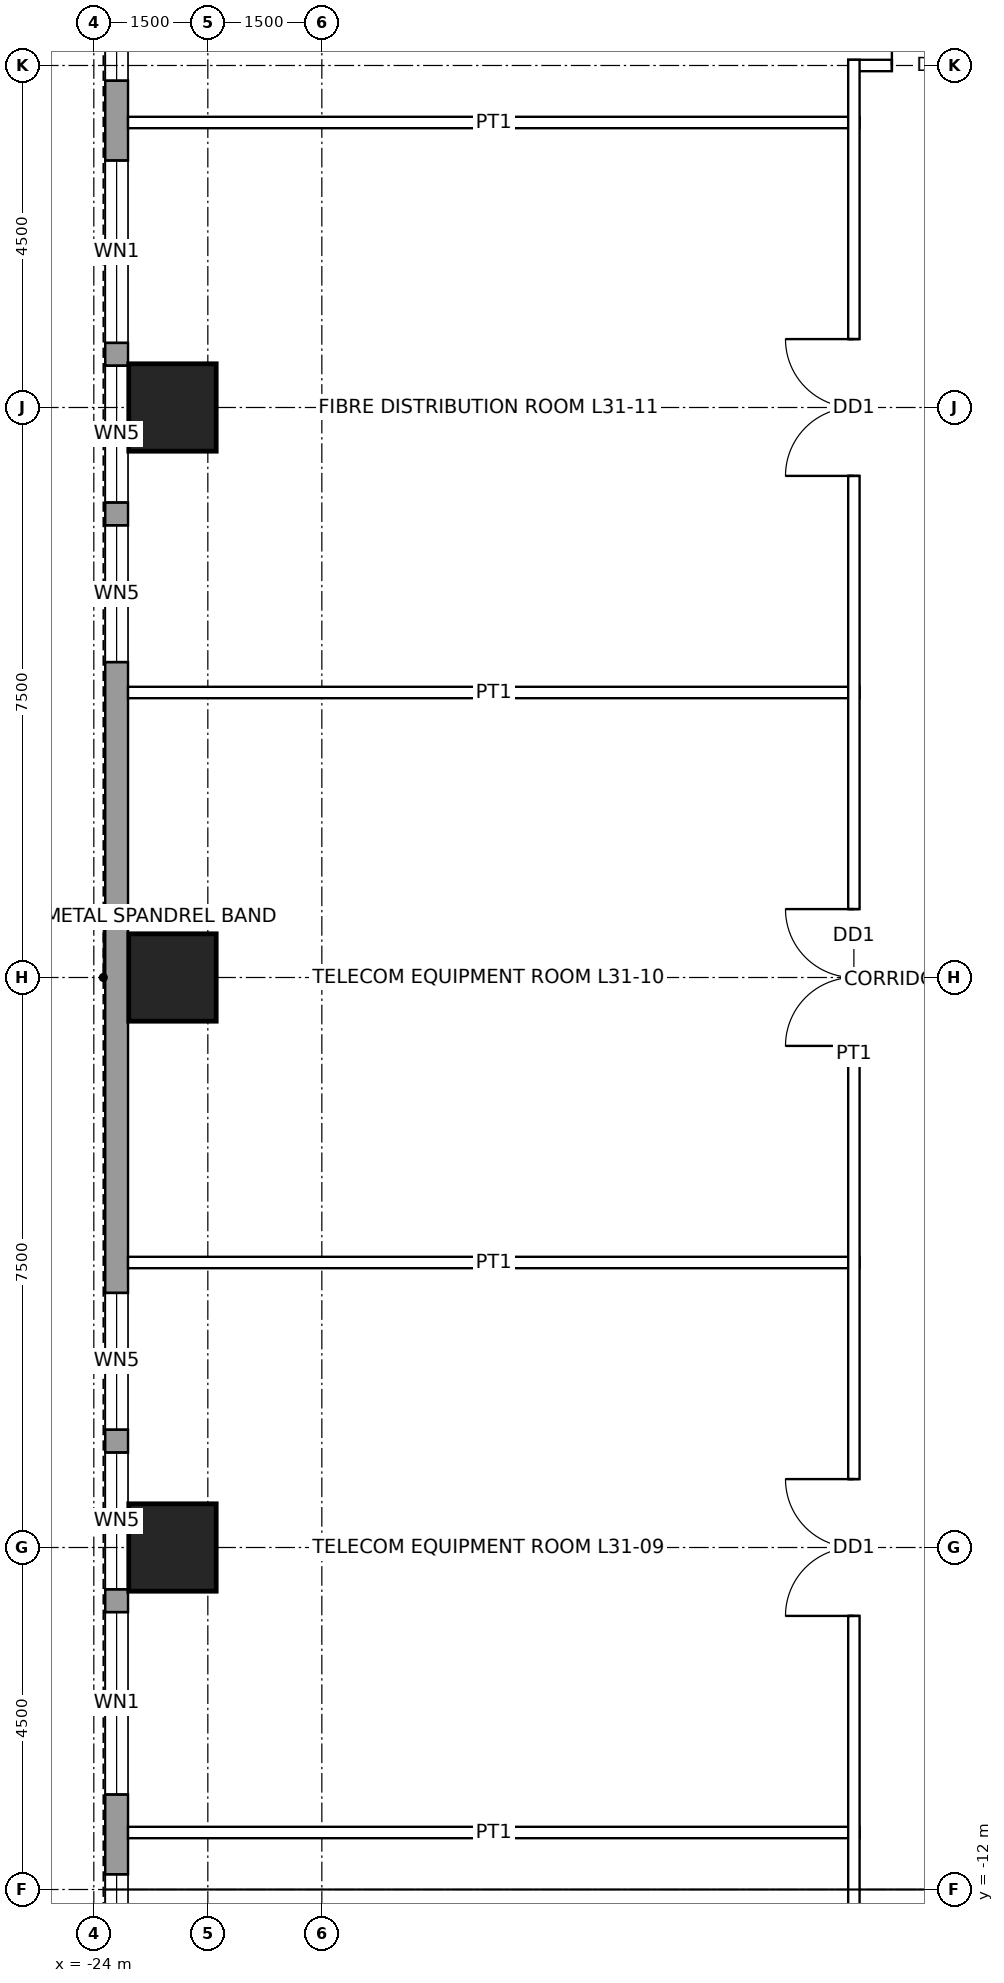
"""IFC4 building model, lengths in metres.
Left out: names, types, materials, properties, quantities, classifications, styles, units other than length and angle.
Written with IfcOpenShell. Run it as: python <this file> out.ifc"""

import sys

from ifc_helpers import new_model, si_unit, direction, frame, frame_2d, origin, origin_2d, place, context, subcontext, project, spatial, rectangle, hollow_rectangle, extrude, element, fill, save


model = new_model("IFC4")
c1 = context("Model", 3, precision=1e-05, world=origin(), true_north=direction((0.0, 1.0)))
c2 = subcontext(c1, "Body", "Model", "MODEL_VIEW")
j1 = project(units=[si_unit("LENGTHUNIT", "METRE"), si_unit("PLANEANGLEUNIT", "RADIAN")], contexts=[c1])
p1 = place(None, origin())
s1 = spatial("IfcSite", under=j1, at=p1, CompositionType="ELEMENT")
p2 = place(p1, origin())
s2 = spatial("IfcBuilding", under=s1, at=p2, CompositionType="ELEMENT")
p3 = place(p2, frame((0.0, 0.0, 153.9)))
s3 = spatial("IfcBuildingStorey", under=s2, at=p3, CompositionType="ELEMENT", Elevation=153.9)
for number, where, z_axis, x_axis in (
    (1, (-22.965, -7.5, 0.0), (0.0, 0.0, 1.0), (1.0, 0.0, 0.0)),
    (2, (-22.965, 0.0, 0.0), (0.0, 0.0, 1.0), (1.0, 0.0, 0.0)),
    (3, (-22.965, 7.5, 0.0), (0.0, 0.0, 1.0), (1.0, 0.0, 0.0)),
):
    element("IfcColumn", number, at=place(p3, frame(where, z_axis=z_axis, x_axis=x_axis)), inside=s3, PredefinedType="COLUMN", context=c2, shape_type="SweptSolid", body=[
        extrude(hollow_rectangle(XDim=1.15, YDim=1.15, WallThickness=0.075, at=origin_2d()), origin(), (0.0, 0.0, 1.0), 4.5),
    ])
p4 = place(p3, frame((-23.7, -16.2, 0.0), z_axis=(0.0, 0.0, 1.0), x_axis=(0.0, 1.0, 0.0)))
e4 = element("IfcWall", 4, at=p4, inside=s3, PredefinedType="SOLIDWALL", context=c2, shape_type="SweptSolid", body=[
    extrude(rectangle(XDim=32.4, YDim=0.3, at=frame_2d((16.2, 0.0))), origin(), (0.0, 0.0, 1.0), 4.3),
])
p5 = place(p4, frame((2.0, 0.0, 1.0)))
e5 = element("IfcOpeningElement", 5, at=p5, cuts=e4, PredefinedType="OPENING", context=c2, shape_type="SweptSolid", body=[
    extrude(rectangle(XDim=2.4, YDim=1.2, at=frame_2d((1.2, 0.6))), frame((0.0, 0.16, 0.0), z_axis=(0.0, -1.0, 0.0), x_axis=(1.0, 0.0, 0.0)), (0.0, 0.0, 1.0), 0.32),
])
p6 = place(p4, frame((5.45, 0.0, 1.0)))
e6 = element("IfcOpeningElement", 6, at=p6, cuts=e4, PredefinedType="OPENING", context=c2, shape_type="SweptSolid", body=[
    extrude(rectangle(XDim=2.4, YDim=1.2, at=frame_2d((1.2, 0.6))), frame((0.0, 0.16, 0.0), z_axis=(0.0, -1.0, 0.0), x_axis=(1.0, 0.0, 0.0)), (0.0, 0.0, 1.0), 0.32),
])
p7 = place(p4, frame((8.15, 0.0, 1.0)))
e7 = element("IfcOpeningElement", 7, at=p7, cuts=e4, PredefinedType="OPENING", context=c2, shape_type="SweptSolid", body=[
    extrude(rectangle(XDim=1.8, YDim=1.2, at=frame_2d((0.9, 0.6))), frame((0.0, 0.16, 0.0), z_axis=(0.0, -1.0, 0.0), x_axis=(1.0, 0.0, 0.0)), (0.0, 0.0, 1.0), 0.32),
])
p8 = place(p4, frame((10.25, 0.0, 1.0)))
e8 = element("IfcOpeningElement", 8, at=p8, cuts=e4, PredefinedType="OPENING", context=c2, shape_type="SweptSolid", body=[
    extrude(rectangle(XDim=1.8, YDim=1.2, at=frame_2d((0.9, 0.6))), frame((0.0, 0.16, 0.0), z_axis=(0.0, -1.0, 0.0), x_axis=(1.0, 0.0, 0.0)), (0.0, 0.0, 1.0), 0.32),
])
p9 = place(p4, frame((20.35, 0.0, 1.0)))
e9 = element("IfcOpeningElement", 9, at=p9, cuts=e4, PredefinedType="OPENING", context=c2, shape_type="SweptSolid", body=[
    extrude(rectangle(XDim=1.8, YDim=1.2, at=frame_2d((0.9, 0.6))), frame((0.0, 0.16, 0.0), z_axis=(0.0, -1.0, 0.0), x_axis=(1.0, 0.0, 0.0)), (0.0, 0.0, 1.0), 0.32),
])
p10 = place(p4, frame((22.45, 0.0, 1.0)))
e10 = element("IfcOpeningElement", 10, at=p10, cuts=e4, PredefinedType="OPENING", context=c2, shape_type="SweptSolid", body=[
    extrude(rectangle(XDim=1.8, YDim=1.2, at=frame_2d((0.9, 0.6))), frame((0.0, 0.16, 0.0), z_axis=(0.0, -1.0, 0.0), x_axis=(1.0, 0.0, 0.0)), (0.0, 0.0, 1.0), 0.32),
])
p11 = place(p4, frame((24.55, 0.0, 1.0)))
e11 = element("IfcOpeningElement", 11, at=p11, cuts=e4, PredefinedType="OPENING", context=c2, shape_type="SweptSolid", body=[
    extrude(rectangle(XDim=2.4, YDim=1.2, at=frame_2d((1.2, 0.6))), frame((0.0, 0.16, 0.0), z_axis=(0.0, -1.0, 0.0), x_axis=(1.0, 0.0, 0.0)), (0.0, 0.0, 1.0), 0.32),
])
p12 = place(p4, frame((28.0, 0.0, 1.0)))
e12 = element("IfcOpeningElement", 12, at=p12, cuts=e4, PredefinedType="OPENING", context=c2, shape_type="SweptSolid", body=[
    extrude(rectangle(XDim=2.4, YDim=1.2, at=frame_2d((1.2, 0.6))), frame((0.0, 0.16, 0.0), z_axis=(0.0, -1.0, 0.0), x_axis=(1.0, 0.0, 0.0)), (0.0, 0.0, 1.0), 0.32),
])
for number, where, z_axis, x_axis in (
    (13, (-23.55, -11.25, 0.0), (0.0, 0.0, 1.0), (1.0, 0.0, 0.0)),
    (14, (-23.55, -3.75, 0.0), (0.0, 0.0, 1.0), (1.0, 0.0, 0.0)),
    (15, (-23.55, 3.75, 0.0), (0.0, 0.0, 1.0), (1.0, 0.0, 0.0)),
    (16, (-23.55, 11.25, 0.0), (0.0, 0.0, 1.0), (1.0, 0.0, 0.0)),
):
    element("IfcWall", number, at=place(p3, frame(where, z_axis=z_axis, x_axis=x_axis)), inside=s3, PredefinedType="PARTITIONING", context=c2, shape_type="SweptSolid", body=[
        extrude(rectangle(XDim=9.625, YDim=0.15, at=frame_2d((4.812, 0.0))), origin(), (0.0, 0.0, 1.0), 3.431),
    ])
p13 = place(p3, frame((-14.075, 12.0, 0.0), z_axis=(0.0, 0.0, 1.0), x_axis=(1.0, 0.0, 0.0)))
e17 = element("IfcWall", 17, at=p13, inside=s3, PredefinedType="PARTITIONING", context=c2, shape_type="SweptSolid", body=[
    extrude(rectangle(XDim=2.075, YDim=0.15, at=frame_2d((1.038, 0.0))), origin(), (0.0, 0.0, 1.0), 4.3),
])
p14 = place(p13, frame((0.575, 0.0, 0.0)))
e18 = element("IfcOpeningElement", 18, at=p14, cuts=e17, PredefinedType="OPENING", context=c2, shape_type="SweptSolid", body=[
    extrude(rectangle(XDim=1.0, YDim=2.1, at=frame_2d((0.5, 1.05))), frame((0.0, 0.085, 0.0), z_axis=(0.0, -1.0, 0.0), x_axis=(1.0, 0.0, 0.0)), (0.0, 0.0, 1.0), 0.17),
])
p15 = place(p3, frame((-14.0, -14.075, 0.0), z_axis=(0.0, 0.0, 1.0), x_axis=(0.0, 1.0, 0.0)))
e19 = element("IfcWall", 19, at=p15, inside=s3, PredefinedType="PARTITIONING", context=c2, shape_type="SweptSolid", body=[
    extrude(rectangle(XDim=26.15, YDim=0.15, at=frame_2d((13.075, 0.0))), origin(), (0.0, 0.0, 1.0), 4.3),
])
p16 = place(p15, frame((5.675, 0.0, 0.0)))
e20 = element("IfcOpeningElement", 20, at=p16, cuts=e19, PredefinedType="OPENING", context=c2, shape_type="SweptSolid", body=[
    extrude(rectangle(XDim=1.8, YDim=2.4, at=frame_2d((0.9, 1.2))), frame((0.0, 0.085, 0.0), z_axis=(0.0, -1.0, 0.0), x_axis=(1.0, 0.0, 0.0)), (0.0, 0.0, 1.0), 0.17),
])
p17 = place(p15, frame((13.175, 0.0, 0.0)))
e21 = element("IfcOpeningElement", 21, at=p17, cuts=e19, PredefinedType="OPENING", context=c2, shape_type="SweptSolid", body=[
    extrude(rectangle(XDim=1.8, YDim=2.4, at=frame_2d((0.9, 1.2))), frame((0.0, 0.085, 0.0), z_axis=(0.0, -1.0, 0.0), x_axis=(1.0, 0.0, 0.0)), (0.0, 0.0, 1.0), 0.17),
])
p18 = place(p15, frame((20.675, 0.0, 0.0)))
e22 = element("IfcOpeningElement", 22, at=p18, cuts=e19, PredefinedType="OPENING", context=c2, shape_type="SweptSolid", body=[
    extrude(rectangle(XDim=1.8, YDim=2.4, at=frame_2d((0.9, 1.2))), frame((0.0, 0.085, 0.0), z_axis=(0.0, -1.0, 0.0), x_axis=(1.0, 0.0, 0.0)), (0.0, 0.0, 1.0), 0.17),
])
p19 = place(p5, origin())
e23 = element("IfcWindow", 23, at=p19, inside=s3, PartitioningType="SINGLE_PANEL", PredefinedType="WINDOW", context=c2, shape_type="SweptSolid", body=[
    extrude(rectangle(XDim=2.4, YDim=1.2, at=frame_2d((1.2, 0.6))), frame((0.0, 0.03, 0.0), z_axis=(0.0, -1.0, 0.0), x_axis=(1.0, 0.0, 0.0)), (0.0, 0.0, 1.0), 0.06),
])
fill(e5, e23)
p20 = place(p6, origin())
e24 = element("IfcWindow", 24, at=p20, inside=s3, PartitioningType="SINGLE_PANEL", PredefinedType="WINDOW", context=c2, shape_type="SweptSolid", body=[
    extrude(rectangle(XDim=2.4, YDim=1.2, at=frame_2d((1.2, 0.6))), frame((0.0, 0.03, 0.0), z_axis=(0.0, -1.0, 0.0), x_axis=(1.0, 0.0, 0.0)), (0.0, 0.0, 1.0), 0.06),
])
fill(e6, e24)
p21 = place(p7, origin())
e25 = element("IfcWindow", 25, at=p21, inside=s3, PartitioningType="SINGLE_PANEL", PredefinedType="WINDOW", context=c2, shape_type="SweptSolid", body=[
    extrude(rectangle(XDim=1.8, YDim=1.2, at=frame_2d((0.9, 0.6))), frame((0.0, 0.03, 0.0), z_axis=(0.0, -1.0, 0.0), x_axis=(1.0, 0.0, 0.0)), (0.0, 0.0, 1.0), 0.06),
])
fill(e7, e25)
p22 = place(p8, origin())
e26 = element("IfcWindow", 26, at=p22, inside=s3, PartitioningType="SINGLE_PANEL", PredefinedType="WINDOW", context=c2, shape_type="SweptSolid", body=[
    extrude(rectangle(XDim=1.8, YDim=1.2, at=frame_2d((0.9, 0.6))), frame((0.0, 0.03, 0.0), z_axis=(0.0, -1.0, 0.0), x_axis=(1.0, 0.0, 0.0)), (0.0, 0.0, 1.0), 0.06),
])
fill(e8, e26)
p23 = place(p9, origin())
e27 = element("IfcWindow", 27, at=p23, inside=s3, PartitioningType="SINGLE_PANEL", PredefinedType="WINDOW", context=c2, shape_type="SweptSolid", body=[
    extrude(rectangle(XDim=1.8, YDim=1.2, at=frame_2d((0.9, 0.6))), frame((0.0, 0.03, 0.0), z_axis=(0.0, -1.0, 0.0), x_axis=(1.0, 0.0, 0.0)), (0.0, 0.0, 1.0), 0.06),
])
fill(e9, e27)
p24 = place(p10, origin())
e28 = element("IfcWindow", 28, at=p24, inside=s3, PartitioningType="SINGLE_PANEL", PredefinedType="WINDOW", context=c2, shape_type="SweptSolid", body=[
    extrude(rectangle(XDim=1.8, YDim=1.2, at=frame_2d((0.9, 0.6))), frame((0.0, 0.03, 0.0), z_axis=(0.0, -1.0, 0.0), x_axis=(1.0, 0.0, 0.0)), (0.0, 0.0, 1.0), 0.06),
])
fill(e10, e28)
p25 = place(p11, origin())
e29 = element("IfcWindow", 29, at=p25, inside=s3, PartitioningType="SINGLE_PANEL", PredefinedType="WINDOW", context=c2, shape_type="SweptSolid", body=[
    extrude(rectangle(XDim=2.4, YDim=1.2, at=frame_2d((1.2, 0.6))), frame((0.0, 0.03, 0.0), z_axis=(0.0, -1.0, 0.0), x_axis=(1.0, 0.0, 0.0)), (0.0, 0.0, 1.0), 0.06),
])
fill(e11, e29)
p26 = place(p12, origin())
e30 = element("IfcWindow", 30, at=p26, inside=s3, PartitioningType="SINGLE_PANEL", PredefinedType="WINDOW", context=c2, shape_type="SweptSolid", body=[
    extrude(rectangle(XDim=2.4, YDim=1.2, at=frame_2d((1.2, 0.6))), frame((0.0, 0.03, 0.0), z_axis=(0.0, -1.0, 0.0), x_axis=(1.0, 0.0, 0.0)), (0.0, 0.0, 1.0), 0.06),
])
fill(e12, e30)
p27 = place(p16, origin())
e31 = element("IfcDoor", 31, at=p27, inside=s3, OperationType="DOUBLE_DOOR_SINGLE_SWING", PredefinedType="DOOR", context=c2, shape_type="SweptSolid", body=[
    extrude(rectangle(XDim=1.8, YDim=2.4, at=frame_2d((0.9, 1.2))), frame((0.0, 0.025, 0.0), z_axis=(0.0, -1.0, 0.0), x_axis=(1.0, 0.0, 0.0)), (0.0, 0.0, 1.0), 0.05),
])
fill(e20, e31)
p28 = place(p17, origin())
e32 = element("IfcDoor", 32, at=p28, inside=s3, OperationType="DOUBLE_DOOR_SINGLE_SWING", PredefinedType="DOOR", context=c2, shape_type="SweptSolid", body=[
    extrude(rectangle(XDim=1.8, YDim=2.4, at=frame_2d((0.9, 1.2))), frame((0.0, 0.025, 0.0), z_axis=(0.0, -1.0, 0.0), x_axis=(1.0, 0.0, 0.0)), (0.0, 0.0, 1.0), 0.05),
])
fill(e21, e32)
p29 = place(p18, origin())
e33 = element("IfcDoor", 33, at=p29, inside=s3, OperationType="DOUBLE_DOOR_SINGLE_SWING", PredefinedType="DOOR", context=c2, shape_type="SweptSolid", body=[
    extrude(rectangle(XDim=1.8, YDim=2.4, at=frame_2d((0.9, 1.2))), frame((0.0, 0.025, 0.0), z_axis=(0.0, -1.0, 0.0), x_axis=(1.0, 0.0, 0.0)), (0.0, 0.0, 1.0), 0.05),
])
fill(e22, e33)
p30 = place(p14, origin())
e34 = element("IfcDoor", 34, at=p30, inside=s3, OperationType="SINGLE_SWING_LEFT", PredefinedType="DOOR", context=c2, shape_type="SweptSolid", body=[
    extrude(rectangle(XDim=1.0, YDim=2.1, at=frame_2d((0.5, 1.05))), frame((0.0, 0.025, 0.0), z_axis=(0.0, -1.0, 0.0), x_axis=(1.0, 0.0, 0.0)), (0.0, 0.0, 1.0), 0.05),
])
fill(e18, e34)
save(model, sys.argv[1])
